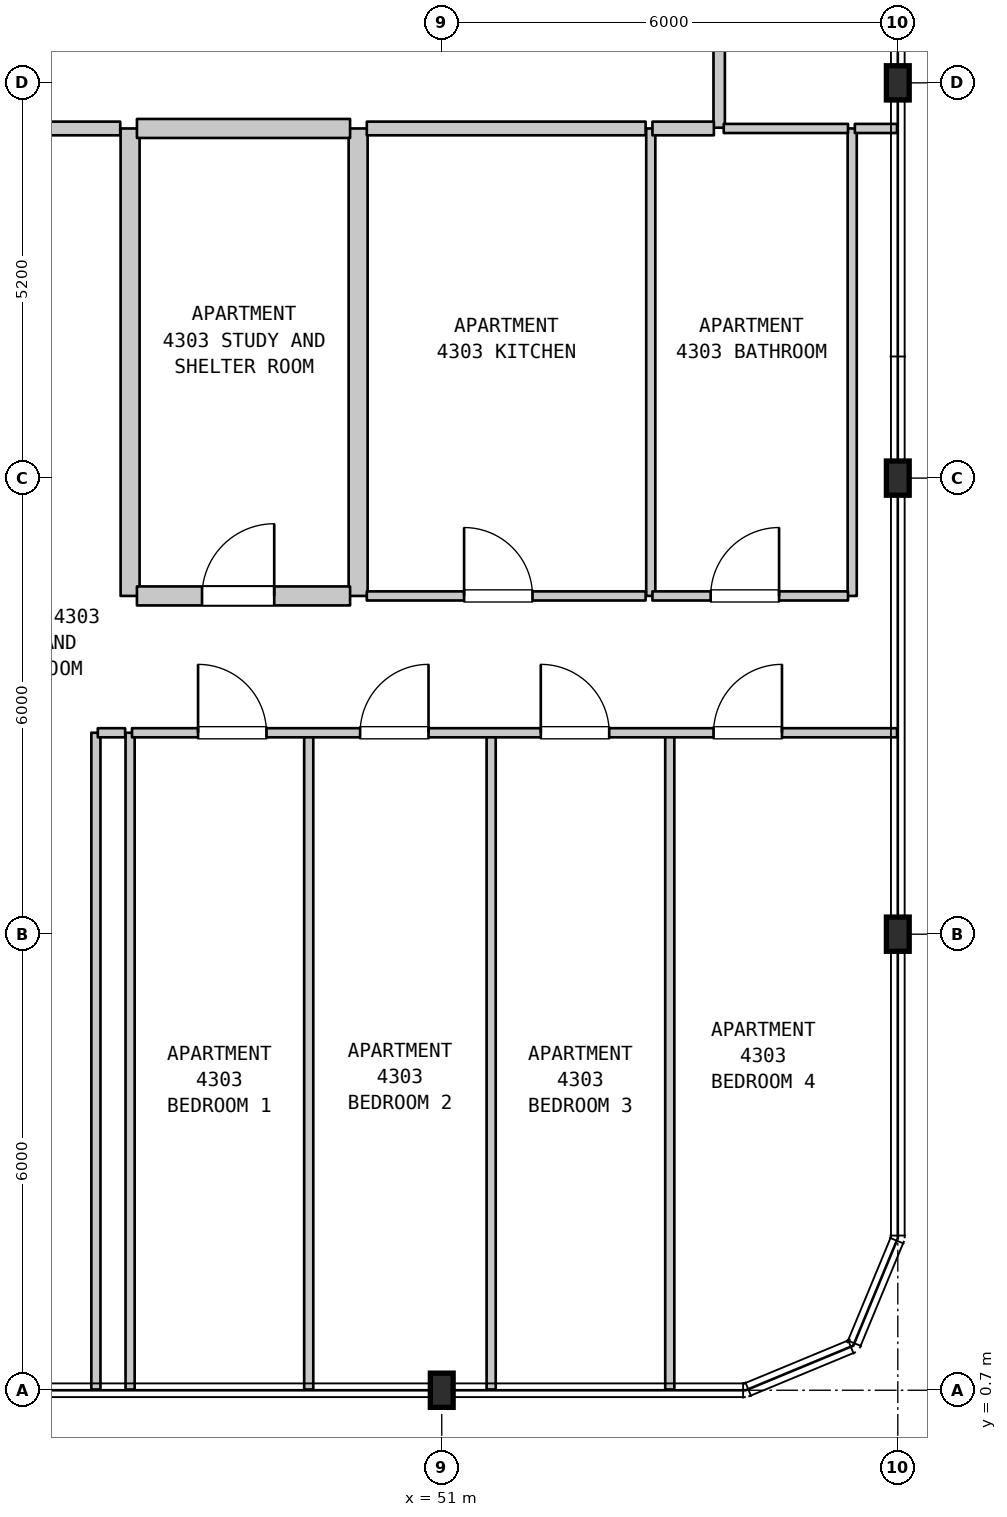
"""IFC4 building model, lengths in metres.
Left out: names, types, materials, properties, quantities, classifications, styles, units other than length and angle.
Written with IfcOpenShell. Run it as: python <this file> out.ifc"""

import sys

from ifc_helpers import new_model, si_unit, direction, frame, frame_2d, origin, origin_2d, place, context, subcontext, project, spatial, rectangle, i_section, extrude, element, fill, save


model = new_model("IFC4")
c1 = context("Model", 3, precision=1e-05, world=origin(), true_north=direction((0.0, 1.0)))
c2 = subcontext(c1, "Body", "Model", "MODEL_VIEW")
j1 = project(units=[si_unit("LENGTHUNIT", "METRE"), si_unit("PLANEANGLEUNIT", "RADIAN")], contexts=[c1])
p1 = place(None, origin())
s1 = spatial("IfcSite", under=j1, at=p1, CompositionType="ELEMENT")
p2 = place(p1, origin())
s2 = spatial("IfcBuilding", under=s1, at=p2, CompositionType="ELEMENT")
p3 = place(p2, frame((0.0, 0.0, 176.5)))
s3 = spatial("IfcBuildingStorey", under=s2, at=p3, CompositionType="ELEMENT", Elevation=176.5)
for number, where, z_axis, x_axis in (
    (1, (51.0, 0.7, 0.0), (0.0, 0.0, 1.0), (1.0, 0.0, 0.0)),
    (2, (57.0, 6.7, 0.0), (0.0, 0.0, 1.0), (1.0, 0.0, 0.0)),
    (3, (57.0, 12.7, 0.0), (0.0, 0.0, 1.0), (1.0, 0.0, 0.0)),
    (4, (57.0, 17.9, 0.0), (0.0, 0.0, 1.0), (1.0, 0.0, 0.0)),
):
    element("IfcColumn", number, at=place(p3, frame(where, z_axis=z_axis, x_axis=x_axis)), inside=s3, PredefinedType="COLUMN", context=c2, shape_type="SweptSolid", body=[
        extrude(i_section(OverallWidth=0.3, OverallDepth=0.45, WebThickness=0.014, FlangeThickness=0.026, FilletRadius=0.027, at=origin_2d()), origin(), (0.0, 0.0, 1.0), 3.7),
    ])
for number, where, z_axis, x_axis in (
    (5, (46.45, 0.71, 0.0), (0.0, 0.0, 1.0), (0.0, 1.0, 0.0)),
    (6, (46.9, 0.71, 0.0), (0.0, 0.0, 1.0), (0.0, 1.0, 0.0)),
):
    element("IfcWall", number, at=place(p3, frame(where, z_axis=z_axis, x_axis=x_axis)), inside=s3, PredefinedType="PARTITIONING", context=c2, shape_type="SweptSolid", body=[
        extrude(rectangle(XDim=8.64, YDim=0.12, at=frame_2d((4.32, 0.0))), origin(), (0.0, 0.0, 1.0), 3.39),
    ])
p4 = place(p3, frame((46.9, 11.15, 0.0), z_axis=(0.0, 0.0, 1.0), x_axis=(0.0, 1.0, 0.0)))
e7 = element("IfcWall", 7, at=p4, inside=s3, PredefinedType="STANDARD", context=c2, shape_type="SweptSolid", body=[
    extrude(rectangle(XDim=6.15, YDim=0.25, at=frame_2d((3.075, 0.0))), origin(), (0.0, 0.0, 1.0), 3.39),
])
p5 = place(p3, frame((49.25, 0.71, 0.0), z_axis=(0.0, 0.0, 1.0), x_axis=(0.0, 1.0, 0.0)))
e8 = element("IfcWall", 8, at=p5, inside=s3, PredefinedType="PARTITIONING", context=c2, shape_type="SweptSolid", body=[
    extrude(rectangle(XDim=8.64, YDim=0.12, at=frame_2d((4.32, 0.0))), origin(), (0.0, 0.0, 1.0), 3.39),
])
p6 = place(p3, frame((49.9, 11.15, 0.0), z_axis=(0.0, 0.0, 1.0), x_axis=(0.0, 1.0, 0.0)))
e9 = element("IfcWall", 9, at=p6, inside=s3, PredefinedType="STANDARD", context=c2, shape_type="SweptSolid", body=[
    extrude(rectangle(XDim=6.15, YDim=0.25, at=frame_2d((3.075, 0.0))), origin(), (0.0, 0.0, 1.0), 3.39),
])
p7 = place(p3, frame((51.65, 0.71, 0.0), z_axis=(0.0, 0.0, 1.0), x_axis=(0.0, 1.0, 0.0)))
e10 = element("IfcWall", 10, at=p7, inside=s3, PredefinedType="PARTITIONING", context=c2, shape_type="SweptSolid", body=[
    extrude(rectangle(XDim=8.64, YDim=0.12, at=frame_2d((4.32, 0.0))), origin(), (0.0, 0.0, 1.0), 3.39),
])
p8 = place(p3, frame((53.75, 11.15, 0.0), z_axis=(0.0, 0.0, 1.0), x_axis=(0.0, 1.0, 0.0)))
e11 = element("IfcWall", 11, at=p8, inside=s3, PredefinedType="PARTITIONING", context=c2, shape_type="SweptSolid", body=[
    extrude(rectangle(XDim=6.15, YDim=0.12, at=frame_2d((3.075, 0.0))), origin(), (0.0, 0.0, 1.0), 3.39),
])
p9 = place(p3, frame((54.0, 0.71, 0.0), z_axis=(0.0, 0.0, 1.0), x_axis=(0.0, 1.0, 0.0)))
e12 = element("IfcWall", 12, at=p9, inside=s3, PredefinedType="PARTITIONING", context=c2, shape_type="SweptSolid", body=[
    extrude(rectangle(XDim=8.64, YDim=0.12, at=frame_2d((4.32, 0.0))), origin(), (0.0, 0.0, 1.0), 3.39),
])
p10 = place(p3, frame((54.65, 17.31, 0.0), z_axis=(0.0, 0.0, 1.0), x_axis=(0.0, 1.0, 0.0)))
e13 = element("IfcWall", 13, at=p10, inside=s3, PredefinedType="STANDARD", context=c2, shape_type="SweptSolid", body=[
    extrude(rectangle(XDim=2.19, YDim=0.15, at=frame_2d((1.095, 0.0))), origin(), (0.0, 0.0, 1.0), 3.39),
])
p11 = place(p3, frame((56.4, 11.15, 0.0), z_axis=(0.0, 0.0, 1.0), x_axis=(0.0, 1.0, 0.0)))
e14 = element("IfcWall", 14, at=p11, inside=s3, PredefinedType="PARTITIONING", context=c2, shape_type="SweptSolid", body=[
    extrude(rectangle(XDim=6.15, YDim=0.12, at=frame_2d((3.075, 0.0))), origin(), (0.0, 0.0, 1.0), 3.39),
])
p12 = place(p3, frame((46.475, 9.35, 0.0), z_axis=(0.0, 0.0, 1.0), x_axis=(1.0, 0.0, 0.0)))
e15 = element("IfcWall", 15, at=p12, inside=s3, PredefinedType="PARTITIONING", context=c2, shape_type="SweptSolid", body=[
    extrude(rectangle(XDim=0.36, YDim=0.12, at=frame_2d((0.18, 0.0))), origin(), (0.0, 0.0, 1.0), 3.39),
])
p13 = place(p3, frame((46.925, 9.35, 0.0), z_axis=(0.0, 0.0, 1.0), x_axis=(1.0, 0.0, 0.0)))
e16 = element("IfcWall", 16, at=p13, inside=s3, PredefinedType="PARTITIONING", context=c2, shape_type="SweptSolid", body=[
    extrude(rectangle(XDim=10.065, YDim=0.12, at=frame_2d((5.032, 0.0))), origin(), (0.0, 0.0, 1.0), 3.39),
])
p14 = place(p13, frame((0.869, 0.0, 0.0)))
e17 = element("IfcOpeningElement", 17, at=p14, cuts=e16, PredefinedType="OPENING", context=c2, shape_type="SweptSolid", body=[
    extrude(rectangle(XDim=0.9, YDim=2.15, at=frame_2d((0.45, 1.075))), frame((0.0, 0.07, 0.0), z_axis=(0.0, -1.0, 0.0), x_axis=(1.0, 0.0, 0.0)), (0.0, 0.0, 1.0), 0.14),
])
p15 = place(p13, frame((3.001, 0.0, 0.0)))
e18 = element("IfcOpeningElement", 18, at=p15, cuts=e16, PredefinedType="OPENING", context=c2, shape_type="SweptSolid", body=[
    extrude(rectangle(XDim=0.9, YDim=2.15, at=frame_2d((0.45, 1.075))), frame((0.0, 0.07, 0.0), z_axis=(0.0, -1.0, 0.0), x_axis=(1.0, 0.0, 0.0)), (0.0, 0.0, 1.0), 0.14),
])
p16 = place(p13, frame((5.378, 0.0, 0.0)))
e19 = element("IfcOpeningElement", 19, at=p16, cuts=e16, PredefinedType="OPENING", context=c2, shape_type="SweptSolid", body=[
    extrude(rectangle(XDim=0.9, YDim=2.15, at=frame_2d((0.45, 1.075))), frame((0.0, 0.07, 0.0), z_axis=(0.0, -1.0, 0.0), x_axis=(1.0, 0.0, 0.0)), (0.0, 0.0, 1.0), 0.14),
])
p17 = place(p13, frame((7.651, 0.0, 0.0)))
e20 = element("IfcOpeningElement", 20, at=p17, cuts=e16, PredefinedType="OPENING", context=c2, shape_type="SweptSolid", body=[
    extrude(rectangle(XDim=0.9, YDim=2.15, at=frame_2d((0.45, 1.075))), frame((0.0, 0.07, 0.0), z_axis=(0.0, -1.0, 0.0), x_axis=(1.0, 0.0, 0.0)), (0.0, 0.0, 1.0), 0.14),
])
p18 = place(p3, frame((46.99, 11.15, 0.0), z_axis=(0.0, 0.0, 1.0), x_axis=(1.0, 0.0, 0.0)))
e21 = element("IfcWall", 21, at=p18, inside=s3, PredefinedType="STANDARD", context=c2, shape_type="SweptSolid", body=[
    extrude(rectangle(XDim=2.804, YDim=0.25, at=frame_2d((1.402, 0.0))), origin(), (0.0, 0.0, 1.0), 3.39),
])
p19 = place(p18, frame((0.856, 0.0, 0.0)))
e22 = element("IfcOpeningElement", 22, at=p19, cuts=e21, PredefinedType="OPENING", context=c2, shape_type="SweptSolid", body=[
    extrude(rectangle(XDim=0.95, YDim=2.15, at=frame_2d((0.475, 1.075))), frame((0.0, 0.135, 0.0), z_axis=(0.0, -1.0, 0.0), x_axis=(1.0, 0.0, 0.0)), (0.0, 0.0, 1.0), 0.27),
])
p20 = place(p3, frame((50.014, 11.15, 0.0), z_axis=(0.0, 0.0, 1.0), x_axis=(1.0, 0.0, 0.0)))
e23 = element("IfcWall", 23, at=p20, inside=s3, PredefinedType="PARTITIONING", context=c2, shape_type="SweptSolid", body=[
    extrude(rectangle(XDim=3.668, YDim=0.12, at=frame_2d((1.834, 0.0))), origin(), (0.0, 0.0, 1.0), 3.39),
])
p21 = place(p20, frame((1.28, 0.0, 0.0)))
e24 = element("IfcOpeningElement", 24, at=p21, cuts=e23, PredefinedType="OPENING", context=c2, shape_type="SweptSolid", body=[
    extrude(rectangle(XDim=0.9, YDim=2.15, at=frame_2d((0.45, 1.075))), frame((0.0, 0.07, 0.0), z_axis=(0.0, -1.0, 0.0), x_axis=(1.0, 0.0, 0.0)), (0.0, 0.0, 1.0), 0.14),
])
p22 = place(p3, frame((53.772, 11.15, 0.0), z_axis=(0.0, 0.0, 1.0), x_axis=(1.0, 0.0, 0.0)))
e25 = element("IfcWall", 25, at=p22, inside=s3, PredefinedType="PARTITIONING", context=c2, shape_type="SweptSolid", body=[
    extrude(rectangle(XDim=2.573, YDim=0.12, at=frame_2d((1.287, 0.0))), origin(), (0.0, 0.0, 1.0), 3.39),
])
p23 = place(p22, frame((0.766, 0.0, 0.0)))
e26 = element("IfcOpeningElement", 26, at=p23, cuts=e25, PredefinedType="OPENING", context=c2, shape_type="SweptSolid", body=[
    extrude(rectangle(XDim=0.9, YDim=2.1, at=frame_2d((0.45, 1.05))), frame((0.0, 0.07, 0.0), z_axis=(0.0, -1.0, 0.0), x_axis=(1.0, 0.0, 0.0)), (0.0, 0.0, 1.0), 0.14),
])
p24 = place(p3, frame((41.225, 17.3, 0.0), z_axis=(0.0, 0.0, 1.0), x_axis=(1.0, 0.0, 0.0)))
e27 = element("IfcWall", 27, at=p24, inside=s3, PredefinedType="STANDARD", context=c2, shape_type="SweptSolid", body=[
    extrude(rectangle(XDim=5.545, YDim=0.18, at=frame_2d((2.772, 0.0))), origin(), (0.0, 0.0, 1.0), 3.39),
])
p25 = place(p24, frame((2.305, 0.0, 0.0)))
e28 = element("IfcOpeningElement", 28, at=p25, cuts=e27, PredefinedType="OPENING", context=c2, shape_type="SweptSolid", body=[
    extrude(rectangle(XDim=1.0, YDim=2.15, at=frame_2d((0.5, 1.075))), frame((0.0, 0.1, 0.0), z_axis=(0.0, -1.0, 0.0), x_axis=(1.0, 0.0, 0.0)), (0.0, 0.0, 1.0), 0.2),
])
p26 = place(p3, frame((46.99, 17.3, 0.0), z_axis=(0.0, 0.0, 1.0), x_axis=(1.0, 0.0, 0.0)))
e29 = element("IfcWall", 29, at=p26, inside=s3, PredefinedType="STANDARD", context=c2, shape_type="SweptSolid", body=[
    extrude(rectangle(XDim=2.804, YDim=0.25, at=frame_2d((1.402, 0.0))), origin(), (0.0, 0.0, 1.0), 3.39),
])
p27 = place(p3, frame((50.014, 17.3, 0.0), z_axis=(0.0, 0.0, 1.0), x_axis=(1.0, 0.0, 0.0)))
e30 = element("IfcWall", 30, at=p27, inside=s3, PredefinedType="STANDARD", context=c2, shape_type="SweptSolid", body=[
    extrude(rectangle(XDim=3.668, YDim=0.18, at=frame_2d((1.834, 0.0))), origin(), (0.0, 0.0, 1.0), 3.39),
])
p28 = place(p3, frame((53.772, 17.3, 0.0), z_axis=(0.0, 0.0, 1.0), x_axis=(1.0, 0.0, 0.0)))
e31 = element("IfcWall", 31, at=p28, inside=s3, PredefinedType="STANDARD", context=c2, shape_type="SweptSolid", body=[
    extrude(rectangle(XDim=0.808, YDim=0.18, at=frame_2d((0.404, 0.0))), origin(), (0.0, 0.0, 1.0), 3.39),
])
p29 = place(p3, frame((54.71, 17.3, 0.0), z_axis=(0.0, 0.0, 1.0), x_axis=(1.0, 0.0, 0.0)))
e32 = element("IfcWall", 32, at=p29, inside=s3, PredefinedType="PARTITIONING", context=c2, shape_type="SweptSolid", body=[
    extrude(rectangle(XDim=1.635, YDim=0.12, at=frame_2d((0.817, 0.0))), origin(), (0.0, 0.0, 1.0), 3.39),
])
p30 = place(p3, frame((56.435, 17.3, 0.0), z_axis=(0.0, 0.0, 1.0), x_axis=(1.0, 0.0, 0.0)))
e33 = element("IfcWall", 33, at=p30, inside=s3, PredefinedType="PARTITIONING", context=c2, shape_type="SweptSolid", body=[
    extrude(rectangle(XDim=0.555, YDim=0.12, at=frame_2d((0.277, 0.0))), origin(), (0.0, 0.0, 1.0), 3.39),
])
p31 = place(p14, origin())
e34 = element("IfcDoor", 34, at=p31, inside=s3, OperationType="SINGLE_SWING_LEFT", PredefinedType="DOOR", context=c2, shape_type="SweptSolid", body=[
    extrude(rectangle(XDim=0.9, YDim=2.15, at=frame_2d((0.45, 1.075))), frame((0.0, 0.025, 0.0), z_axis=(0.0, -1.0, 0.0), x_axis=(1.0, 0.0, 0.0)), (0.0, 0.0, 1.0), 0.05),
])
fill(e17, e34)
p32 = place(p15, origin())
e35 = element("IfcDoor", 35, at=p32, inside=s3, OperationType="SINGLE_SWING_RIGHT", PredefinedType="DOOR", context=c2, shape_type="SweptSolid", body=[
    extrude(rectangle(XDim=0.9, YDim=2.15, at=frame_2d((0.45, 1.075))), frame((0.0, 0.025, 0.0), z_axis=(0.0, -1.0, 0.0), x_axis=(1.0, 0.0, 0.0)), (0.0, 0.0, 1.0), 0.05),
])
fill(e18, e35)
p33 = place(p16, origin())
e36 = element("IfcDoor", 36, at=p33, inside=s3, OperationType="SINGLE_SWING_LEFT", PredefinedType="DOOR", context=c2, shape_type="SweptSolid", body=[
    extrude(rectangle(XDim=0.9, YDim=2.15, at=frame_2d((0.45, 1.075))), frame((0.0, 0.025, 0.0), z_axis=(0.0, -1.0, 0.0), x_axis=(1.0, 0.0, 0.0)), (0.0, 0.0, 1.0), 0.05),
])
fill(e19, e36)
p34 = place(p17, origin())
e37 = element("IfcDoor", 37, at=p34, inside=s3, OperationType="SINGLE_SWING_RIGHT", PredefinedType="DOOR", context=c2, shape_type="SweptSolid", body=[
    extrude(rectangle(XDim=0.9, YDim=2.15, at=frame_2d((0.45, 1.075))), frame((0.0, 0.025, 0.0), z_axis=(0.0, -1.0, 0.0), x_axis=(1.0, 0.0, 0.0)), (0.0, 0.0, 1.0), 0.05),
])
fill(e20, e37)
p35 = place(p19, origin())
e38 = element("IfcDoor", 38, at=p35, inside=s3, OperationType="SINGLE_SWING_RIGHT", PredefinedType="DOOR", context=c2, shape_type="SweptSolid", body=[
    extrude(rectangle(XDim=0.95, YDim=2.15, at=frame_2d((0.475, 1.075))), frame((0.0, 0.025, 0.0), z_axis=(0.0, -1.0, 0.0), x_axis=(1.0, 0.0, 0.0)), (0.0, 0.0, 1.0), 0.05),
])
fill(e22, e38)
p36 = place(p21, origin())
e39 = element("IfcDoor", 39, at=p36, inside=s3, OperationType="SINGLE_SWING_LEFT", PredefinedType="DOOR", context=c2, shape_type="SweptSolid", body=[
    extrude(rectangle(XDim=0.9, YDim=2.15, at=frame_2d((0.45, 1.075))), frame((0.0, 0.025, 0.0), z_axis=(0.0, -1.0, 0.0), x_axis=(1.0, 0.0, 0.0)), (0.0, 0.0, 1.0), 0.05),
])
fill(e24, e39)
p37 = place(p23, origin())
e40 = element("IfcDoor", 40, at=p37, inside=s3, OperationType="SINGLE_SWING_RIGHT", PredefinedType="DOOR", context=c2, shape_type="SweptSolid", body=[
    extrude(rectangle(XDim=0.9, YDim=2.1, at=frame_2d((0.45, 1.05))), frame((0.0, 0.025, 0.0), z_axis=(0.0, -1.0, 0.0), x_axis=(1.0, 0.0, 0.0)), (0.0, 0.0, 1.0), 0.05),
])
fill(e26, e40)
save(model, sys.argv[1])
